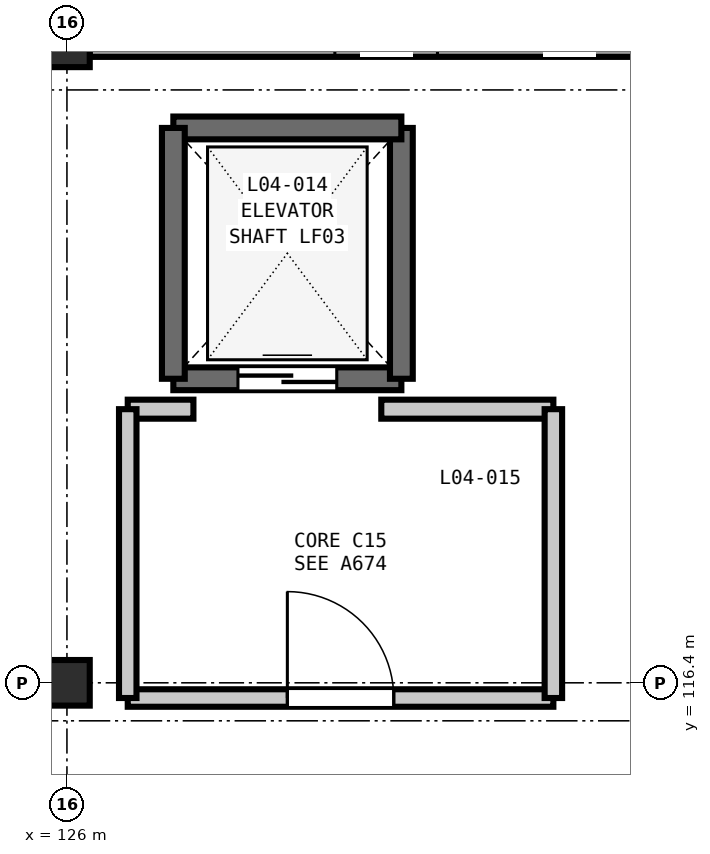
"""IFC4 building model, lengths in metres.
Left out: names, types, materials, properties, quantities, classifications, styles, units other than length and angle.
Written with IfcOpenShell. Run it as: python <this file> out.ifc"""

import sys

from ifc_helpers import new_model, si_unit, direction, frame, frame_2d, origin, origin_2d, place, context, subcontext, project, spatial, rectangle, extrude, element, fill, save


model = new_model("IFC4")
c1 = context("Model", 3, precision=1e-05, world=origin(), true_north=direction((0.0, 1.0)))
c2 = subcontext(c1, "Body", "Model", "MODEL_VIEW")
j1 = project(units=[si_unit("LENGTHUNIT", "METRE"), si_unit("PLANEANGLEUNIT", "RADIAN")], contexts=[c1])
p1 = place(None, origin())
s1 = spatial("IfcSite", under=j1, at=p1, CompositionType="ELEMENT")
p2 = place(p1, origin())
s2 = spatial("IfcBuilding", under=s1, at=p2, CompositionType="ELEMENT")
p3 = place(p2, frame((0.0, 0.0, 20.4)))
s3 = spatial("IfcBuildingStorey", under=s2, at=p3, CompositionType="ELEMENT", Elevation=20.4)
for number, where, z_axis, x_axis in (
    (1, (126.0, 116.4, 0.0), (0.0, 0.0, 1.0), (1.0, 0.0, 0.0)),
    (2, (126.0, 124.8, 0.0), (0.0, 0.0, 1.0), (1.0, 0.0, 0.0)),
):
    element("IfcColumn", number, at=place(p3, frame(where, z_axis=z_axis, x_axis=x_axis)), inside=s3, PredefinedType="COLUMN", context=c2, shape_type="SweptSolid", body=[
        extrude(rectangle(XDim=0.6, YDim=0.6, at=origin_2d()), origin(), (0.0, 0.0, 1.0), 4.2),
    ])
p4 = place(p3, frame((126.298, 124.8, 0.0), z_axis=(0.0, 0.0, 1.0), x_axis=(1.0, 0.0, 0.0)))
e3 = element("IfcWall", 3, at=p4, inside=s3, PredefinedType="SOLIDWALL", context=c2, shape_type="SweptSolid", body=[
    extrude(rectangle(XDim=7.804, YDim=0.33, at=frame_2d((3.902, 0.0))), origin(), (0.0, 0.0, 1.0), 3.48),
])
p5 = place(p4, frame((3.227, 0.0, 0.9)))
e4 = element("IfcOpeningElement", 4, at=p5, cuts=e3, PredefinedType="OPENING", context=c2, shape_type="SweptSolid", body=[
    extrude(rectangle(XDim=1.35, YDim=1.55, at=frame_2d((0.675, 0.775))), frame((0.0, 0.175, 0.0), z_axis=(0.0, -1.0, 0.0), x_axis=(1.0, 0.0, 0.0)), (0.0, 0.0, 1.0), 0.35),
])
p6 = place(p3, frame((127.4, 120.4, 0.0), z_axis=(0.0, 0.0, 1.0), x_axis=(1.0, 0.0, 0.0)))
e5 = element("IfcWall", 5, at=p6, inside=s3, PredefinedType="SHEAR", context=c2, shape_type="SweptSolid", body=[
    extrude(rectangle(XDim=3.0, YDim=0.3, at=frame_2d((1.5, 0.0))), origin(), (0.0, 0.0, 1.0), 4.2),
])
p7 = place(p6, frame((0.85, 0.0, 0.0)))
e6 = element("IfcOpeningElement", 6, at=p7, cuts=e5, PredefinedType="OPENING", context=c2, shape_type="SweptSolid", body=[
    extrude(rectangle(XDim=1.3, YDim=2.2, at=frame_2d((0.65, 1.1))), frame((0.0, 0.16, 0.0), z_axis=(0.0, -1.0, 0.0), x_axis=(1.0, 0.0, 0.0)), (0.0, 0.0, 1.0), 0.32),
])
p8 = place(p3, frame((130.4, 120.4, 0.0), z_axis=(0.0, 0.0, 1.0), x_axis=(0.0, 1.0, 0.0)))
e7 = element("IfcWall", 7, at=p8, inside=s3, PredefinedType="SHEAR", context=c2, shape_type="SweptSolid", body=[
    extrude(rectangle(XDim=3.3, YDim=0.3, at=frame_2d((1.65, 0.0))), origin(), (0.0, 0.0, 1.0), 4.2),
])
p9 = place(p3, frame((130.4, 123.7, 0.0), z_axis=(0.0, 0.0, 1.0), x_axis=(-1.0, 0.0, 0.0)))
e8 = element("IfcWall", 8, at=p9, inside=s3, PredefinedType="SHEAR", context=c2, shape_type="SweptSolid", body=[
    extrude(rectangle(XDim=3.0, YDim=0.3, at=frame_2d((1.5, 0.0))), origin(), (0.0, 0.0, 1.0), 4.2),
])
p10 = place(p3, frame((127.4, 123.7, 0.0), z_axis=(0.0, 0.0, 1.0), x_axis=(0.0, -1.0, 0.0)))
e9 = element("IfcWall", 9, at=p10, inside=s3, PredefinedType="SHEAR", context=c2, shape_type="SweptSolid", body=[
    extrude(rectangle(XDim=3.3, YDim=0.3, at=frame_2d((1.65, 0.0))), origin(), (0.0, 0.0, 1.0), 4.2),
])
p11 = place(p3, frame((126.8, 116.2, 0.0), z_axis=(0.0, 0.0, 1.0), x_axis=(1.0, 0.0, 0.0)))
e10 = element("IfcWall", 10, at=p11, inside=s3, PredefinedType="PARTITIONING", context=c2, shape_type="SweptSolid", body=[
    extrude(rectangle(XDim=5.6, YDim=0.23, at=frame_2d((2.8, 0.0))), origin(), (0.0, 0.0, 1.0), 3.585),
])
p12 = place(p11, frame((2.1, 0.0, 0.0)))
e11 = element("IfcOpeningElement", 11, at=p12, cuts=e10, PredefinedType="OPENING", context=c2, shape_type="SweptSolid", body=[
    extrude(rectangle(XDim=1.4, YDim=2.2, at=frame_2d((0.7, 1.1))), frame((0.0, 0.125, 0.0), z_axis=(0.0, -1.0, 0.0), x_axis=(1.0, 0.0, 0.0)), (0.0, 0.0, 1.0), 0.25),
])
p13 = place(p3, frame((130.136, 120.0, 0.0), z_axis=(0.0, 0.0, 1.0), x_axis=(1.0, 0.0, 0.0)))
e12 = element("IfcWall", 12, at=p13, inside=s3, PredefinedType="PARTITIONING", context=c2, shape_type="SweptSolid", body=[
    extrude(rectangle(XDim=2.264, YDim=0.25, at=frame_2d((1.132, 0.0))), origin(), (0.0, 0.0, 1.0), 3.82),
])
p14 = place(p3, frame((126.8, 120.0, 0.0), z_axis=(0.0, 0.0, 1.0), x_axis=(1.0, 0.0, 0.0)))
e13 = element("IfcWall", 13, at=p14, inside=s3, PredefinedType="PARTITIONING", context=c2, shape_type="SweptSolid", body=[
    extrude(rectangle(XDim=0.864, YDim=0.25, at=frame_2d((0.432, 0.0))), origin(), (0.0, 0.0, 1.0), 3.82),
])
for number, where, z_axis, x_axis in (
    (14, (126.8, 116.2, 0.0), (0.0, 0.0, 1.0), (0.0, 1.0, 0.0)),
    (15, (132.4, 116.2, 0.0), (0.0, 0.0, 1.0), (0.0, 1.0, 0.0)),
):
    element("IfcWall", number, at=place(p3, frame(where, z_axis=z_axis, x_axis=x_axis)), inside=s3, PredefinedType="PARTITIONING", context=c2, shape_type="SweptSolid", body=[
        extrude(rectangle(XDim=3.8, YDim=0.23, at=frame_2d((1.9, 0.0))), origin(), (0.0, 0.0, 1.0), 3.82),
    ])
p15 = place(p7, origin())
e16 = element("IfcDoor", 16, at=p15, inside=s3, OperationType="DOUBLE_DOOR_SLIDING", PredefinedType="DOOR", context=c2, shape_type="SweptSolid", body=[
    extrude(rectangle(XDim=1.3, YDim=2.2, at=frame_2d((0.65, 1.1))), frame((0.0, 0.025, 0.0), z_axis=(0.0, -1.0, 0.0), x_axis=(1.0, 0.0, 0.0)), (0.0, 0.0, 1.0), 0.05),
])
fill(e6, e16)
p16 = place(p12, origin())
e17 = element("IfcDoor", 17, at=p16, inside=s3, OperationType="SINGLE_SWING_LEFT", PredefinedType="DOOR", context=c2, shape_type="SweptSolid", body=[
    extrude(rectangle(XDim=1.4, YDim=2.2, at=frame_2d((0.7, 1.1))), frame((0.0, 0.025, 0.0), z_axis=(0.0, -1.0, 0.0), x_axis=(1.0, 0.0, 0.0)), (0.0, 0.0, 1.0), 0.05),
])
fill(e11, e17)
save(model, sys.argv[1])
